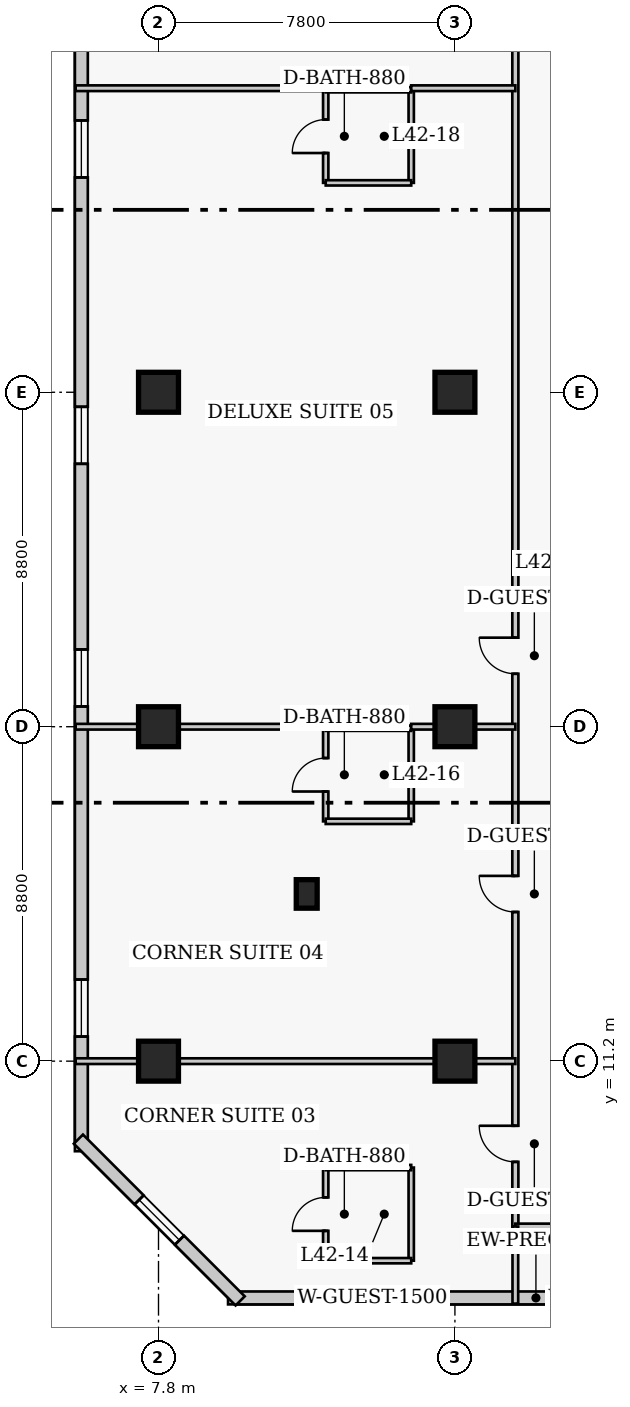
"""IFC4 building model, lengths in metres.
Left out: names, types, materials, properties, quantities, classifications, styles, units other than length and angle.
Written with IfcOpenShell. Run it as: python <this file> out.ifc"""

import sys

from ifc_helpers import new_model, si_unit, direction, frame, frame_2d, origin, origin_2d, place, context, subcontext, project, spatial, rectangle, extrude, element, fill, save


model = new_model("IFC4")
c1 = context("Model", 3, precision=1e-05, world=origin(), true_north=direction((0.0, 1.0)))
c2 = subcontext(c1, "Body", "Model", "MODEL_VIEW")
j1 = project(units=[si_unit("LENGTHUNIT", "METRE"), si_unit("PLANEANGLEUNIT", "RADIAN")], contexts=[c1])
p1 = place(None, origin())
s1 = spatial("IfcSite", under=j1, at=p1, CompositionType="ELEMENT")
p2 = place(p1, origin())
s2 = spatial("IfcBuilding", under=s1, at=p2, CompositionType="ELEMENT")
p3 = place(p2, frame((0.0, 0.0, 168.8)))
s3 = spatial("IfcBuildingStorey", under=s2, at=p3, CompositionType="ELEMENT", Elevation=168.8)
for number, where, z_axis, x_axis in (
    (1, (7.8, 11.2, 0.0), (0.0, 0.0, 1.0), (1.0, 0.0, 0.0)),
    (2, (7.8, 20.0, 0.0), (0.0, 0.0, 1.0), (1.0, 0.0, 0.0)),
    (3, (7.8, 28.8, 0.0), (0.0, 0.0, 1.0), (1.0, 0.0, 0.0)),
    (4, (15.6, 11.2, 0.0), (0.0, 0.0, 1.0), (1.0, 0.0, 0.0)),
    (5, (15.6, 20.0, 0.0), (0.0, 0.0, 1.0), (1.0, 0.0, 0.0)),
    (6, (15.6, 28.8, 0.0), (0.0, 0.0, 1.0), (1.0, 0.0, 0.0)),
):
    element("IfcColumn", number, at=place(p3, frame(where, z_axis=z_axis, x_axis=x_axis)), inside=s3, PredefinedType="COLUMN", context=c2, shape_type="SweptSolid", body=[
        extrude(rectangle(XDim=1.05, YDim=1.05, at=origin_2d()), origin(), (0.0, 0.0, 1.0), 3.8),
    ])
p4 = place(p3, frame((11.7, 15.6, 0.0), z_axis=(0.0, 0.0, 1.0), x_axis=(1.0, 0.0, 0.0)))
e7 = element("IfcColumn", 7, at=p4, inside=s3, PredefinedType="PILASTER", context=c2, shape_type="SweptSolid", body=[
    extrude(rectangle(XDim=0.55, YDim=0.75, at=origin_2d()), origin(), (0.0, 0.0, 1.0), 3.8),
])
p5 = place(p3, frame((9.63, 4.97, 0.0), z_axis=(0.0, 0.0, 1.0), x_axis=(1.0, 0.0, 0.0)))
e8 = element("IfcWall", 8, at=p5, inside=s3, PredefinedType="SOLIDWALL", context=c2, shape_type="SweptSolid", body=[
    extrude(rectangle(XDim=26.69, YDim=0.34, at=frame_2d((13.345, 0.0))), origin(), (0.0, 0.0, 1.0), 3.55),
])
p6 = place(p5, frame((16.97, 0.0, 0.0)))
e9 = element("IfcOpeningElement", 9, at=p6, cuts=e8, PredefinedType="OPENING", context=c2, shape_type="SweptSolid", body=[
    extrude(rectangle(XDim=1.4, YDim=2.15, at=frame_2d((0.7, 1.075))), frame((0.0, 0.18, 0.0), z_axis=(0.0, -1.0, 0.0), x_axis=(1.0, 0.0, 0.0)), (0.0, 0.0, 1.0), 0.36),
])
p7 = place(p5, frame((3.048, 0.0, 0.85)))
e10 = element("IfcOpeningElement", 10, at=p7, cuts=e8, PredefinedType="OPENING", context=c2, shape_type="SweptSolid", body=[
    extrude(rectangle(XDim=1.5, YDim=1.75, at=frame_2d((0.75, 0.875))), frame((0.0, 0.18, 0.0), z_axis=(0.0, -1.0, 0.0), x_axis=(1.0, 0.0, 0.0)), (0.0, 0.0, 1.0), 0.36),
])
p8 = place(p5, frame((22.642, 0.0, 0.85)))
e11 = element("IfcOpeningElement", 11, at=p8, cuts=e8, PredefinedType="OPENING", context=c2, shape_type="SweptSolid", body=[
    extrude(rectangle(XDim=1.5, YDim=1.75, at=frame_2d((0.75, 0.875))), frame((0.0, 0.18, 0.0), z_axis=(0.0, -1.0, 0.0), x_axis=(1.0, 0.0, 0.0)), (0.0, 0.0, 1.0), 0.36),
])
p9 = place(p5, frame((11.655, 0.0, 0.85)))
e12 = element("IfcOpeningElement", 12, at=p9, cuts=e8, PredefinedType="OPENING", context=c2, shape_type="SweptSolid", body=[
    extrude(rectangle(XDim=1.3, YDim=1.7, at=frame_2d((0.65, 0.85))), frame((0.0, 0.18, 0.0), z_axis=(0.0, -1.0, 0.0), x_axis=(1.0, 0.0, 0.0)), (0.0, 0.0, 1.0), 0.36),
])
p10 = place(p3, frame((5.77, 38.97, 0.0), z_axis=(0.0, 0.0, 1.0), x_axis=(0.0, -1.0, 0.0)))
e13 = element("IfcWall", 13, at=p10, inside=s3, PredefinedType="SOLIDWALL", context=c2, shape_type="SweptSolid", body=[
    extrude(rectangle(XDim=30.14, YDim=0.34, at=frame_2d((15.07, 0.0))), origin(), (0.0, 0.0, 1.0), 3.55),
])
p11 = place(p10, frame((3.018, 0.0, 0.85)))
e14 = element("IfcOpeningElement", 14, at=p11, cuts=e13, PredefinedType="OPENING", context=c2, shape_type="SweptSolid", body=[
    extrude(rectangle(XDim=1.5, YDim=1.75, at=frame_2d((0.75, 0.875))), frame((0.0, 0.18, 0.0), z_axis=(0.0, -1.0, 0.0), x_axis=(1.0, 0.0, 0.0)), (0.0, 0.0, 1.0), 0.36),
])
p12 = place(p10, frame((10.552, 0.0, 0.85)))
e15 = element("IfcOpeningElement", 15, at=p12, cuts=e13, PredefinedType="OPENING", context=c2, shape_type="SweptSolid", body=[
    extrude(rectangle(XDim=1.5, YDim=1.75, at=frame_2d((0.75, 0.875))), frame((0.0, 0.18, 0.0), z_axis=(0.0, -1.0, 0.0), x_axis=(1.0, 0.0, 0.0)), (0.0, 0.0, 1.0), 0.36),
])
p13 = place(p10, frame((16.938, 0.0, 0.85)))
e16 = element("IfcOpeningElement", 16, at=p13, cuts=e13, PredefinedType="OPENING", context=c2, shape_type="SweptSolid", body=[
    extrude(rectangle(XDim=1.5, YDim=1.75, at=frame_2d((0.75, 0.875))), frame((0.0, 0.18, 0.0), z_axis=(0.0, -1.0, 0.0), x_axis=(1.0, 0.0, 0.0)), (0.0, 0.0, 1.0), 0.36),
])
p14 = place(p10, frame((25.623, 0.0, 0.85)))
e17 = element("IfcOpeningElement", 17, at=p14, cuts=e13, PredefinedType="OPENING", context=c2, shape_type="SweptSolid", body=[
    extrude(rectangle(XDim=1.5, YDim=1.75, at=frame_2d((0.75, 0.875))), frame((0.0, 0.18, 0.0), z_axis=(0.0, -1.0, 0.0), x_axis=(1.0, 0.0, 0.0)), (0.0, 0.0, 1.0), 0.36),
])
p15 = place(p3, frame((5.692, 9.148, 0.0), z_axis=(0.0, 0.0, 1.0), x_axis=(0.707106781187, -0.707106781187, 0.0)))
e18 = element("IfcWall", 18, at=p15, inside=s3, PredefinedType="SOLIDWALL", context=c2, shape_type="SweptSolid", body=[
    extrude(rectangle(XDim=6.02, YDim=0.34, at=frame_2d((3.01, 0.0))), origin(), (0.0, 0.0, 1.0), 3.55),
])
p16 = place(p15, frame((2.26, 0.0, 0.85)))
e19 = element("IfcOpeningElement", 19, at=p16, cuts=e18, PredefinedType="OPENING", context=c2, shape_type="SweptSolid", body=[
    extrude(rectangle(XDim=1.5, YDim=1.75, at=frame_2d((0.75, 0.875))), frame((0.0, 0.18, 0.0), z_axis=(0.0, -1.0, 0.0), x_axis=(1.0, 0.0, 0.0)), (0.0, 0.0, 1.0), 0.36),
])
p17 = place(p3, frame((17.19, 6.85, 0.0), z_axis=(0.0, 0.0, 1.0), x_axis=(0.0, 1.0, 0.0)))
e20 = element("IfcWall", 20, at=p17, inside=s3, PredefinedType="PARTITIONING", context=c2, shape_type="SweptSolid", body=[
    extrude(rectangle(XDim=33.8, YDim=0.16, at=frame_2d((16.9, 0.0))), origin(), (0.0, 0.0, 1.0), 3.55),
])
p18 = place(p17, frame((1.7, 0.0, 0.0)))
e21 = element("IfcOpeningElement", 21, at=p18, cuts=e20, PredefinedType="OPENING", context=c2, shape_type="SweptSolid", body=[
    extrude(rectangle(XDim=0.95, YDim=2.1, at=frame_2d((0.475, 1.05))), frame((0.0, 0.09, 0.0), z_axis=(0.0, -1.0, 0.0), x_axis=(1.0, 0.0, 0.0)), (0.0, 0.0, 1.0), 0.18),
])
p19 = place(p17, frame((8.275, 0.0, 0.0)))
e22 = element("IfcOpeningElement", 22, at=p19, cuts=e20, PredefinedType="OPENING", context=c2, shape_type="SweptSolid", body=[
    extrude(rectangle(XDim=0.95, YDim=2.1, at=frame_2d((0.475, 1.05))), frame((0.0, 0.09, 0.0), z_axis=(0.0, -1.0, 0.0), x_axis=(1.0, 0.0, 0.0)), (0.0, 0.0, 1.0), 0.18),
])
p20 = place(p17, frame((14.543, 0.0, 0.0)))
e23 = element("IfcOpeningElement", 23, at=p20, cuts=e20, PredefinedType="OPENING", context=c2, shape_type="SweptSolid", body=[
    extrude(rectangle(XDim=0.95, YDim=2.1, at=frame_2d((0.475, 1.05))), frame((0.0, 0.09, 0.0), z_axis=(0.0, -1.0, 0.0), x_axis=(1.0, 0.0, 0.0)), (0.0, 0.0, 1.0), 0.18),
])
p21 = place(p17, frame((32.36, 0.0, 0.0)))
e24 = element("IfcOpeningElement", 24, at=p21, cuts=e20, PredefinedType="OPENING", context=c2, shape_type="SweptSolid", body=[
    extrude(rectangle(XDim=1.0, YDim=2.15, at=frame_2d((0.5, 1.075))), frame((0.0, 0.09, 0.0), z_axis=(0.0, -1.0, 0.0), x_axis=(1.0, 0.0, 0.0)), (0.0, 0.0, 1.0), 0.18),
])
p22 = place(p3, frame((17.19, 6.85, 0.0), z_axis=(0.0, 0.0, 1.0), x_axis=(1.0, 0.0, 0.0)))
e25 = element("IfcWall", 25, at=p22, inside=s3, PredefinedType="PARTITIONING", context=c2, shape_type="SweptSolid", body=[
    extrude(rectangle(XDim=2.22, YDim=0.15, at=frame_2d((1.11, 0.0))), origin(), (0.0, 0.0, 1.0), 3.55),
])
p23 = place(p3, frame((17.19, 4.82, 0.0), z_axis=(0.0, 0.0, 1.0), x_axis=(0.0, 1.0, 0.0)))
e26 = element("IfcWall", 26, at=p23, inside=s3, PredefinedType="PARTITIONING", context=c2, shape_type="SweptSolid", body=[
    extrude(rectangle(XDim=2.03, YDim=0.15, at=frame_2d((1.015, 0.0))), origin(), (0.0, 0.0, 1.0), 3.55),
])
p24 = place(p3, frame((12.2, 5.95, 0.0), z_axis=(0.0, 0.0, 1.0), x_axis=(0.0, 1.0, 0.0)))
e27 = element("IfcWall", 27, at=p24, inside=s3, PredefinedType="PLUMBINGWALL", context=c2, shape_type="SweptSolid", body=[
    extrude(rectangle(XDim=2.45, YDim=0.14, at=frame_2d((1.225, 0.0))), origin(), (0.0, 0.0, 1.0), 3.55),
])
p25 = place(p24, frame((0.785, 0.0, 0.0)))
e28 = element("IfcOpeningElement", 28, at=p25, cuts=e27, PredefinedType="OPENING", context=c2, shape_type="SweptSolid", body=[
    extrude(rectangle(XDim=0.88, YDim=2.05, at=frame_2d((0.44, 1.025))), frame((0.0, 0.08, 0.0), z_axis=(0.0, -1.0, 0.0), x_axis=(1.0, 0.0, 0.0)), (0.0, 0.0, 1.0), 0.16),
])
p26 = place(p3, frame((14.45, 5.95, 0.0), z_axis=(0.0, 0.0, 1.0), x_axis=(0.0, 1.0, 0.0)))
e29 = element("IfcWall", 29, at=p26, inside=s3, PredefinedType="PLUMBINGWALL", context=c2, shape_type="SweptSolid", body=[
    extrude(rectangle(XDim=2.45, YDim=0.14, at=frame_2d((1.225, 0.0))), origin(), (0.0, 0.0, 1.0), 3.55),
])
for number, where, z_axis, x_axis in (
    (30, (12.2, 5.95, 0.0), (0.0, 0.0, 1.0), (1.0, 0.0, 0.0)),
    (31, (12.2, 8.4, 0.0), (0.0, 0.0, 1.0), (1.0, 0.0, 0.0)),
):
    element("IfcWall", number, at=place(p3, frame(where, z_axis=z_axis, x_axis=x_axis)), inside=s3, PredefinedType="PLUMBINGWALL", context=c2, shape_type="SweptSolid", body=[
        extrude(rectangle(XDim=2.25, YDim=0.14, at=frame_2d((1.125, 0.0))), origin(), (0.0, 0.0, 1.0), 3.55),
    ])
p27 = place(p3, frame((5.62, 11.2, 0.0), z_axis=(0.0, 0.0, 1.0), x_axis=(1.0, 0.0, 0.0)))
e32 = element("IfcWall", 32, at=p27, inside=s3, PredefinedType="PARTITIONING", context=c2, shape_type="SweptSolid", body=[
    extrude(rectangle(XDim=11.57, YDim=0.15, at=frame_2d((5.785, 0.0))), origin(), (0.0, 0.0, 1.0), 2.778),
])
p28 = place(p3, frame((12.2, 17.51, 0.0), z_axis=(0.0, 0.0, 1.0), x_axis=(0.0, 1.0, 0.0)))
e33 = element("IfcWall", 33, at=p28, inside=s3, PredefinedType="PLUMBINGWALL", context=c2, shape_type="SweptSolid", body=[
    extrude(rectangle(XDim=2.45, YDim=0.14, at=frame_2d((1.225, 0.0))), origin(), (0.0, 0.0, 1.0), 3.55),
])
p29 = place(p28, frame((0.785, 0.0, 0.0)))
e34 = element("IfcOpeningElement", 34, at=p29, cuts=e33, PredefinedType="OPENING", context=c2, shape_type="SweptSolid", body=[
    extrude(rectangle(XDim=0.88, YDim=2.05, at=frame_2d((0.44, 1.025))), frame((0.0, 0.08, 0.0), z_axis=(0.0, -1.0, 0.0), x_axis=(1.0, 0.0, 0.0)), (0.0, 0.0, 1.0), 0.16),
])
p30 = place(p3, frame((14.45, 17.51, 0.0), z_axis=(0.0, 0.0, 1.0), x_axis=(0.0, 1.0, 0.0)))
e35 = element("IfcWall", 35, at=p30, inside=s3, PredefinedType="PLUMBINGWALL", context=c2, shape_type="SweptSolid", body=[
    extrude(rectangle(XDim=2.45, YDim=0.14, at=frame_2d((1.225, 0.0))), origin(), (0.0, 0.0, 1.0), 3.55),
])
p31 = place(p3, frame((12.2, 17.51, 0.0), z_axis=(0.0, 0.0, 1.0), x_axis=(1.0, 0.0, 0.0)))
e36 = element("IfcWall", 36, at=p31, inside=s3, PredefinedType="PLUMBINGWALL", context=c2, shape_type="SweptSolid", body=[
    extrude(rectangle(XDim=2.25, YDim=0.14, at=frame_2d((1.125, 0.0))), origin(), (0.0, 0.0, 1.0), 3.55),
])
p32 = place(p3, frame((12.2, 19.96, 0.0), z_axis=(0.0, 0.0, 1.0), x_axis=(1.0, 0.0, 0.0)))
e37 = element("IfcWall", 37, at=p32, inside=s3, PredefinedType="PLUMBINGWALL", context=c2, shape_type="SweptSolid", body=[
    extrude(rectangle(XDim=2.25, YDim=0.14, at=frame_2d((1.125, 0.0))), origin(), (0.0, 0.0, 1.0), 2.9),
])
p33 = place(p3, frame((5.62, 20.0, 0.0), z_axis=(0.0, 0.0, 1.0), x_axis=(1.0, 0.0, 0.0)))
e38 = element("IfcWall", 38, at=p33, inside=s3, PredefinedType="PARTITIONING", context=c2, shape_type="SweptSolid", body=[
    extrude(rectangle(XDim=6.58, YDim=0.15, at=frame_2d((3.29, 0.0))), origin(), (0.0, 0.0, 1.0), 2.778),
])
p34 = place(p3, frame((14.45, 20.0, 0.0), z_axis=(0.0, 0.0, 1.0), x_axis=(1.0, 0.0, 0.0)))
e39 = element("IfcWall", 39, at=p34, inside=s3, PredefinedType="PARTITIONING", context=c2, shape_type="SweptSolid", body=[
    extrude(rectangle(XDim=2.74, YDim=0.15, at=frame_2d((1.37, 0.0))), origin(), (0.0, 0.0, 1.0), 2.778),
])
p35 = place(p3, frame((12.2, 34.31, 0.0), z_axis=(0.0, 0.0, 1.0), x_axis=(0.0, 1.0, 0.0)))
e40 = element("IfcWall", 40, at=p35, inside=s3, PredefinedType="PLUMBINGWALL", context=c2, shape_type="SweptSolid", body=[
    extrude(rectangle(XDim=2.45, YDim=0.14, at=frame_2d((1.225, 0.0))), origin(), (0.0, 0.0, 1.0), 3.55),
])
p36 = place(p35, frame((0.785, 0.0, 0.0)))
e41 = element("IfcOpeningElement", 41, at=p36, cuts=e40, PredefinedType="OPENING", context=c2, shape_type="SweptSolid", body=[
    extrude(rectangle(XDim=0.88, YDim=2.05, at=frame_2d((0.44, 1.025))), frame((0.0, 0.08, 0.0), z_axis=(0.0, -1.0, 0.0), x_axis=(1.0, 0.0, 0.0)), (0.0, 0.0, 1.0), 0.16),
])
p37 = place(p3, frame((14.45, 34.31, 0.0), z_axis=(0.0, 0.0, 1.0), x_axis=(0.0, 1.0, 0.0)))
e42 = element("IfcWall", 42, at=p37, inside=s3, PredefinedType="PLUMBINGWALL", context=c2, shape_type="SweptSolid", body=[
    extrude(rectangle(XDim=2.45, YDim=0.14, at=frame_2d((1.225, 0.0))), origin(), (0.0, 0.0, 1.0), 3.55),
])
for number, where, z_axis, x_axis in (
    (43, (12.2, 34.31, 0.0), (0.0, 0.0, 1.0), (1.0, 0.0, 0.0)),
    (44, (12.2, 36.76, 0.0), (0.0, 0.0, 1.0), (1.0, 0.0, 0.0)),
):
    element("IfcWall", number, at=place(p3, frame(where, z_axis=z_axis, x_axis=x_axis)), inside=s3, PredefinedType="PLUMBINGWALL", context=c2, shape_type="SweptSolid", body=[
        extrude(rectangle(XDim=2.25, YDim=0.14, at=frame_2d((1.125, 0.0))), origin(), (0.0, 0.0, 1.0), 3.55),
    ])
p38 = place(p3, frame((5.62, 36.8, 0.0), z_axis=(0.0, 0.0, 1.0), x_axis=(1.0, 0.0, 0.0)))
e45 = element("IfcWall", 45, at=p38, inside=s3, PredefinedType="PARTITIONING", context=c2, shape_type="SweptSolid", body=[
    extrude(rectangle(XDim=6.58, YDim=0.15, at=frame_2d((3.29, 0.0))), origin(), (0.0, 0.0, 1.0), 3.55),
])
p39 = place(p3, frame((14.45, 36.8, 0.0), z_axis=(0.0, 0.0, 1.0), x_axis=(1.0, 0.0, 0.0)))
e46 = element("IfcWall", 46, at=p39, inside=s3, PredefinedType="PARTITIONING", context=c2, shape_type="SweptSolid", body=[
    extrude(rectangle(XDim=2.74, YDim=0.15, at=frame_2d((1.37, 0.0))), origin(), (0.0, 0.0, 1.0), 3.55),
])
p40 = place(p7, origin())
e47 = element("IfcWindow", 47, at=p40, inside=s3, PartitioningType="SINGLE_PANEL", PredefinedType="WINDOW", context=c2, shape_type="SweptSolid", body=[
    extrude(rectangle(XDim=1.5, YDim=1.75, at=frame_2d((0.75, 0.875))), frame((0.0, 0.03, 0.0), z_axis=(0.0, -1.0, 0.0), x_axis=(1.0, 0.0, 0.0)), (0.0, 0.0, 1.0), 0.06),
])
fill(e10, e47)
p41 = place(p11, origin())
e48 = element("IfcWindow", 48, at=p41, inside=s3, PartitioningType="SINGLE_PANEL", PredefinedType="WINDOW", context=c2, shape_type="SweptSolid", body=[
    extrude(rectangle(XDim=1.5, YDim=1.75, at=frame_2d((0.75, 0.875))), frame((0.0, 0.03, 0.0), z_axis=(0.0, -1.0, 0.0), x_axis=(1.0, 0.0, 0.0)), (0.0, 0.0, 1.0), 0.06),
])
fill(e14, e48)
p42 = place(p12, origin())
e49 = element("IfcWindow", 49, at=p42, inside=s3, PartitioningType="SINGLE_PANEL", PredefinedType="WINDOW", context=c2, shape_type="SweptSolid", body=[
    extrude(rectangle(XDim=1.5, YDim=1.75, at=frame_2d((0.75, 0.875))), frame((0.0, 0.03, 0.0), z_axis=(0.0, -1.0, 0.0), x_axis=(1.0, 0.0, 0.0)), (0.0, 0.0, 1.0), 0.06),
])
fill(e15, e49)
p43 = place(p13, origin())
e50 = element("IfcWindow", 50, at=p43, inside=s3, PartitioningType="SINGLE_PANEL", PredefinedType="WINDOW", context=c2, shape_type="SweptSolid", body=[
    extrude(rectangle(XDim=1.5, YDim=1.75, at=frame_2d((0.75, 0.875))), frame((0.0, 0.03, 0.0), z_axis=(0.0, -1.0, 0.0), x_axis=(1.0, 0.0, 0.0)), (0.0, 0.0, 1.0), 0.06),
])
fill(e16, e50)
p44 = place(p14, origin())
e51 = element("IfcWindow", 51, at=p44, inside=s3, PartitioningType="SINGLE_PANEL", PredefinedType="WINDOW", context=c2, shape_type="SweptSolid", body=[
    extrude(rectangle(XDim=1.5, YDim=1.75, at=frame_2d((0.75, 0.875))), frame((0.0, 0.03, 0.0), z_axis=(0.0, -1.0, 0.0), x_axis=(1.0, 0.0, 0.0)), (0.0, 0.0, 1.0), 0.06),
])
fill(e17, e51)
p45 = place(p16, origin())
e52 = element("IfcWindow", 52, at=p45, inside=s3, PartitioningType="SINGLE_PANEL", PredefinedType="WINDOW", context=c2, shape_type="SweptSolid", body=[
    extrude(rectangle(XDim=1.5, YDim=1.75, at=frame_2d((0.75, 0.875))), frame((0.0, 0.03, 0.0), z_axis=(0.0, -1.0, 0.0), x_axis=(1.0, 0.0, 0.0)), (0.0, 0.0, 1.0), 0.06),
])
fill(e19, e52)
p46 = place(p25, origin())
e53 = element("IfcDoor", 53, at=p46, inside=s3, OperationType="SINGLE_SWING_LEFT", PredefinedType="DOOR", context=c2, shape_type="SweptSolid", body=[
    extrude(rectangle(XDim=0.88, YDim=2.05, at=frame_2d((0.44, 1.025))), frame((0.0, 0.025, 0.0), z_axis=(0.0, -1.0, 0.0), x_axis=(1.0, 0.0, 0.0)), (0.0, 0.0, 1.0), 0.05),
])
fill(e28, e53)
p47 = place(p18, origin())
e54 = element("IfcDoor", 54, at=p47, inside=s3, OperationType="SINGLE_SWING_RIGHT", PredefinedType="DOOR", context=c2, shape_type="SweptSolid", body=[
    extrude(rectangle(XDim=0.95, YDim=2.1, at=frame_2d((0.475, 1.05))), frame((0.0, 0.025, 0.0), z_axis=(0.0, -1.0, 0.0), x_axis=(1.0, 0.0, 0.0)), (0.0, 0.0, 1.0), 0.05),
])
fill(e21, e54)
p48 = place(p29, origin())
e55 = element("IfcDoor", 55, at=p48, inside=s3, OperationType="SINGLE_SWING_LEFT", PredefinedType="DOOR", context=c2, shape_type="SweptSolid", body=[
    extrude(rectangle(XDim=0.88, YDim=2.05, at=frame_2d((0.44, 1.025))), frame((0.0, 0.025, 0.0), z_axis=(0.0, -1.0, 0.0), x_axis=(1.0, 0.0, 0.0)), (0.0, 0.0, 1.0), 0.05),
])
fill(e34, e55)
p49 = place(p19, origin())
e56 = element("IfcDoor", 56, at=p49, inside=s3, OperationType="SINGLE_SWING_RIGHT", PredefinedType="DOOR", context=c2, shape_type="SweptSolid", body=[
    extrude(rectangle(XDim=0.95, YDim=2.1, at=frame_2d((0.475, 1.05))), frame((0.0, 0.025, 0.0), z_axis=(0.0, -1.0, 0.0), x_axis=(1.0, 0.0, 0.0)), (0.0, 0.0, 1.0), 0.05),
])
fill(e22, e56)
p50 = place(p36, origin())
e57 = element("IfcDoor", 57, at=p50, inside=s3, OperationType="SINGLE_SWING_LEFT", PredefinedType="DOOR", context=c2, shape_type="SweptSolid", body=[
    extrude(rectangle(XDim=0.88, YDim=2.05, at=frame_2d((0.44, 1.025))), frame((0.0, 0.025, 0.0), z_axis=(0.0, -1.0, 0.0), x_axis=(1.0, 0.0, 0.0)), (0.0, 0.0, 1.0), 0.05),
])
fill(e41, e57)
p51 = place(p20, origin())
e58 = element("IfcDoor", 58, at=p51, inside=s3, OperationType="SINGLE_SWING_RIGHT", PredefinedType="DOOR", context=c2, shape_type="SweptSolid", body=[
    extrude(rectangle(XDim=0.95, YDim=2.1, at=frame_2d((0.475, 1.05))), frame((0.0, 0.025, 0.0), z_axis=(0.0, -1.0, 0.0), x_axis=(1.0, 0.0, 0.0)), (0.0, 0.0, 1.0), 0.05),
])
fill(e23, e58)
save(model, sys.argv[1])
